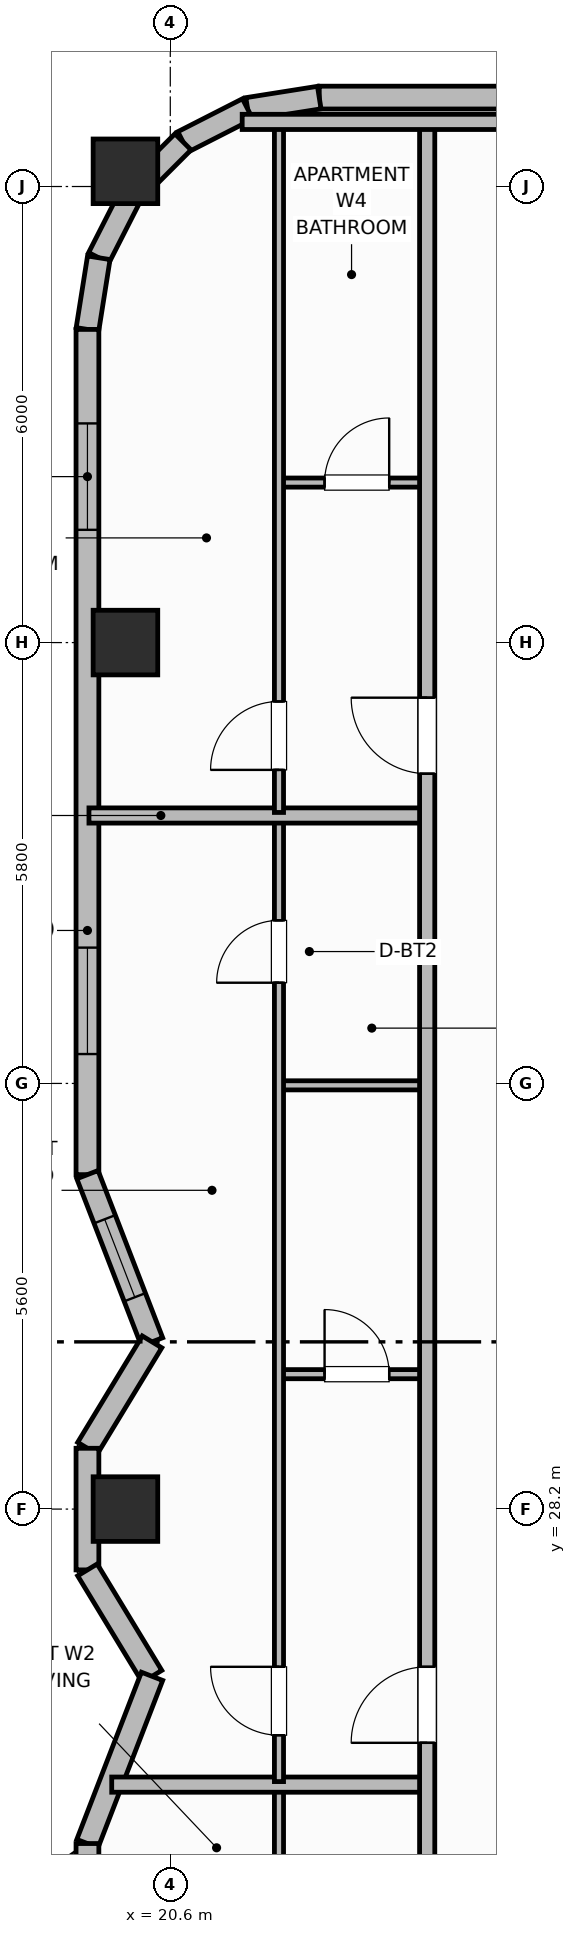
"""IFC4 building model, lengths in metres.
Left out: names, types, materials, properties, quantities, classifications, styles, units other than length and angle.
Written with IfcOpenShell. Run it as: python <this file> out.ifc"""

import sys

from ifc_helpers import new_model, si_unit, direction, frame, frame_2d, origin, origin_2d, place, context, subcontext, project, spatial, rectangle, extrude, element, fill, save


model = new_model("IFC4")
c1 = context("Model", 3, precision=1e-05, world=origin(), true_north=direction((0.0, 1.0)))
c2 = subcontext(c1, "Body", "Model", "MODEL_VIEW")
j1 = project(units=[si_unit("LENGTHUNIT", "METRE"), si_unit("PLANEANGLEUNIT", "RADIAN")], contexts=[c1])
p1 = place(None, origin())
s1 = spatial("IfcSite", under=j1, at=p1, CompositionType="ELEMENT")
p2 = place(p1, origin())
s2 = spatial("IfcBuilding", under=s1, at=p2, CompositionType="ELEMENT")
p3 = place(p2, frame((0.0, 0.0, 233.2)))
s3 = spatial("IfcBuildingStorey", under=s2, at=p3, CompositionType="ELEMENT", Elevation=233.2)
for number, where, z_axis, x_axis in (
    (1, (20.01, 28.2, 0.0), (0.0, 0.0, 1.0), (1.0, 0.0, 0.0)),
    (2, (20.01, 39.6, 0.0), (0.0, 0.0, 1.0), (1.0, 0.0, 0.0)),
    (3, (20.01, 45.8, 0.0), (0.0, 0.0, 1.0), (1.0, 0.0, 0.0)),
):
    element("IfcColumn", number, at=place(p3, frame(where, z_axis=z_axis, x_axis=x_axis)), inside=s3, PredefinedType="COLUMN", context=c2, shape_type="SweptSolid", body=[
        extrude(rectangle(XDim=0.85, YDim=0.85, at=origin_2d()), origin(), (0.0, 0.0, 1.0), 3.7),
    ])
p4 = place(p3, frame((55.84, 46.77, 0.0), z_axis=(0.0, 0.0, 1.0), x_axis=(-1.0, 0.0, 0.0)))
e4 = element("IfcWall", 4, at=p4, inside=s3, PredefinedType="SOLIDWALL", context=c2, shape_type="SweptSolid", body=[
    extrude(rectangle(XDim=33.28, YDim=0.3, at=frame_2d((16.64, 0.0))), origin(), (0.0, 0.0, 1.0), 2.73),
])
p5 = place(p4, frame((4.647, 0.0, 0.71)))
e5 = element("IfcOpeningElement", 5, at=p5, cuts=e4, PredefinedType="OPENING", context=c2, shape_type="SweptSolid", body=[
    extrude(rectangle(XDim=1.6, YDim=1.9, at=frame_2d((0.8, 0.95))), frame((0.0, 0.16, 0.0), z_axis=(0.0, -1.0, 0.0), x_axis=(1.0, 0.0, 0.0)), (0.0, 0.0, 1.0), 0.32),
])
p6 = place(p4, frame((7.845, 0.0, 0.71)))
e6 = element("IfcOpeningElement", 6, at=p6, cuts=e4, PredefinedType="OPENING", context=c2, shape_type="SweptSolid", body=[
    extrude(rectangle(XDim=1.6, YDim=1.9, at=frame_2d((0.8, 0.95))), frame((0.0, 0.16, 0.0), z_axis=(0.0, -1.0, 0.0), x_axis=(1.0, 0.0, 0.0)), (0.0, 0.0, 1.0), 0.32),
])
p7 = place(p4, frame((14.241, 0.0, 0.71)))
e7 = element("IfcOpeningElement", 7, at=p7, cuts=e4, PredefinedType="OPENING", context=c2, shape_type="SweptSolid", body=[
    extrude(rectangle(XDim=1.6, YDim=1.9, at=frame_2d((0.8, 0.95))), frame((0.0, 0.16, 0.0), z_axis=(0.0, -1.0, 0.0), x_axis=(1.0, 0.0, 0.0)), (0.0, 0.0, 1.0), 0.32),
])
p8 = place(p4, frame((17.439, 0.0, 0.71)))
e8 = element("IfcOpeningElement", 8, at=p8, cuts=e4, PredefinedType="OPENING", context=c2, shape_type="SweptSolid", body=[
    extrude(rectangle(XDim=1.6, YDim=1.9, at=frame_2d((0.8, 0.95))), frame((0.0, 0.16, 0.0), z_axis=(0.0, -1.0, 0.0), x_axis=(1.0, 0.0, 0.0)), (0.0, 0.0, 1.0), 0.32),
])
p9 = place(p4, frame((23.835, 0.0, 0.71)))
e9 = element("IfcOpeningElement", 9, at=p9, cuts=e4, PredefinedType="OPENING", context=c2, shape_type="SweptSolid", body=[
    extrude(rectangle(XDim=1.6, YDim=1.9, at=frame_2d((0.8, 0.95))), frame((0.0, 0.16, 0.0), z_axis=(0.0, -1.0, 0.0), x_axis=(1.0, 0.0, 0.0)), (0.0, 0.0, 1.0), 0.32),
])
p10 = place(p4, frame((27.033, 0.0, 0.71)))
e10 = element("IfcOpeningElement", 10, at=p10, cuts=e4, PredefinedType="OPENING", context=c2, shape_type="SweptSolid", body=[
    extrude(rectangle(XDim=1.6, YDim=1.9, at=frame_2d((0.8, 0.95))), frame((0.0, 0.16, 0.0), z_axis=(0.0, -1.0, 0.0), x_axis=(1.0, 0.0, 0.0)), (0.0, 0.0, 1.0), 0.32),
])
p11 = place(p3, frame((22.56, 46.77, 0.0), z_axis=(0.0, 0.0, 1.0), x_axis=(-0.987669453596, -0.156553666304, 0.0)))
e11 = element("IfcWall", 11, at=p11, inside=s3, PredefinedType="SOLIDWALL", context=c2, shape_type="SweptSolid", body=[
    extrude(rectangle(XDim=0.954, YDim=0.3, at=frame_2d((0.477, 0.0))), origin(), (0.0, 0.0, 1.0), 2.73),
])
p12 = place(p3, frame((21.617, 46.621, 0.0), z_axis=(0.0, 0.0, 1.0), x_axis=(-0.891023873617, -0.45395644796, 0.0)))
e12 = element("IfcWall", 12, at=p12, inside=s3, PredefinedType="SOLIDWALL", context=c2, shape_type="SweptSolid", body=[
    extrude(rectangle(XDim=0.954, YDim=0.3, at=frame_2d((0.477, 0.0))), origin(), (0.0, 0.0, 1.0), 2.73),
])
p13 = place(p3, frame((20.767, 46.188, 0.0), z_axis=(0.0, 0.0, 1.0), x_axis=(-0.707106781187, -0.707106781187, 0.0)))
e13 = element("IfcWall", 13, at=p13, inside=s3, PredefinedType="SOLIDWALL", context=c2, shape_type="SweptSolid", body=[
    extrude(rectangle(XDim=0.954, YDim=0.3, at=frame_2d((0.477, 0.0))), origin(), (0.0, 0.0, 1.0), 2.73),
])
p14 = place(p3, frame((20.093, 45.513, 0.0), z_axis=(0.0, 0.0, 1.0), x_axis=(-0.454159573051, -0.890920356825, 0.0)))
e14 = element("IfcWall", 14, at=p14, inside=s3, PredefinedType="SOLIDWALL", context=c2, shape_type="SweptSolid", body=[
    extrude(rectangle(XDim=0.954, YDim=0.3, at=frame_2d((0.477, 0.0))), origin(), (0.0, 0.0, 1.0), 2.73),
])
p15 = place(p3, frame((19.659, 44.663, 0.0), z_axis=(0.0, 0.0, 1.0), x_axis=(-0.156304114255, -0.987708977314, 0.0)))
e15 = element("IfcWall", 15, at=p15, inside=s3, PredefinedType="SOLIDWALL", context=c2, shape_type="SweptSolid", body=[
    extrude(rectangle(XDim=0.954, YDim=0.3, at=frame_2d((0.477, 0.0))), origin(), (0.0, 0.0, 1.0), 2.73),
])
p16 = place(p3, frame((19.51, 43.72, 0.0), z_axis=(0.0, 0.0, 1.0), x_axis=(0.0, -1.0, 0.0)))
e16 = element("IfcWall", 16, at=p16, inside=s3, PredefinedType="SOLIDWALL", context=c2, shape_type="SweptSolid", body=[
    extrude(rectangle(XDim=11.12, YDim=0.3, at=frame_2d((5.56, 0.0))), origin(), (0.0, 0.0, 1.0), 2.73),
])
p17 = place(p16, frame((1.237, 0.0, 0.76)))
e17 = element("IfcOpeningElement", 17, at=p17, cuts=e16, PredefinedType="OPENING", context=c2, shape_type="SweptSolid", body=[
    extrude(rectangle(XDim=1.4, YDim=1.85, at=frame_2d((0.7, 0.925))), frame((0.0, 0.16, 0.0), z_axis=(0.0, -1.0, 0.0), x_axis=(1.0, 0.0, 0.0)), (0.0, 0.0, 1.0), 0.32),
])
p18 = place(p16, frame((8.133, 0.0, 0.76)))
e18 = element("IfcOpeningElement", 18, at=p18, cuts=e16, PredefinedType="OPENING", context=c2, shape_type="SweptSolid", body=[
    extrude(rectangle(XDim=1.4, YDim=1.85, at=frame_2d((0.7, 0.925))), frame((0.0, 0.16, 0.0), z_axis=(0.0, -1.0, 0.0), x_axis=(1.0, 0.0, 0.0)), (0.0, 0.0, 1.0), 0.32),
])
p19 = place(p3, frame((19.51, 32.6, 0.0), z_axis=(0.0, 0.0, 1.0), x_axis=(0.36040746662, -0.932794971044, 0.0)))
e19 = element("IfcWall", 19, at=p19, inside=s3, PredefinedType="SOLIDWALL", context=c2, shape_type="SweptSolid", body=[
    extrude(rectangle(XDim=2.359, YDim=0.3, at=frame_2d((1.179, 0.0))), origin(), (0.0, 0.0, 1.0), 2.73),
])
p20 = place(p19, frame((0.629, 0.0, 0.92)))
e20 = element("IfcOpeningElement", 20, at=p20, cuts=e19, PredefinedType="OPENING", context=c2, shape_type="SweptSolid", body=[
    extrude(rectangle(XDim=1.1, YDim=1.65, at=frame_2d((0.55, 0.825))), frame((0.0, 0.16, 0.0), z_axis=(0.0, -1.0, 0.0), x_axis=(1.0, 0.0, 0.0)), (0.0, 0.0, 1.0), 0.32),
])
p21 = place(p3, frame((20.36, 30.4, 0.0), z_axis=(0.0, 0.0, 1.0), x_axis=(-0.5190481505, -0.854745001426, 0.0)))
e21 = element("IfcWall", 21, at=p21, inside=s3, PredefinedType="SOLIDWALL", context=c2, shape_type="SweptSolid", body=[
    extrude(rectangle(XDim=1.638, YDim=0.3, at=frame_2d((0.819, 0.0))), origin(), (0.0, 0.0, 1.0), 2.73),
])
p22 = place(p3, frame((19.51, 29.0, 0.0), z_axis=(0.0, 0.0, 1.0), x_axis=(0.0, -1.0, 0.0)))
e22 = element("IfcWall", 22, at=p22, inside=s3, PredefinedType="SOLIDWALL", context=c2, shape_type="SweptSolid", body=[
    extrude(rectangle(XDim=1.6, YDim=0.3, at=frame_2d((0.8, 0.0))), origin(), (0.0, 0.0, 1.0), 2.73),
])
p23 = place(p3, frame((19.51, 27.4, 0.0), z_axis=(0.0, 0.0, 1.0), x_axis=(0.5190481505, -0.854745001426, 0.0)))
e23 = element("IfcWall", 23, at=p23, inside=s3, PredefinedType="SOLIDWALL", context=c2, shape_type="SweptSolid", body=[
    extrude(rectangle(XDim=1.638, YDim=0.3, at=frame_2d((0.819, 0.0))), origin(), (0.0, 0.0, 1.0), 2.73),
])
p24 = place(p3, frame((20.36, 26.0, 0.0), z_axis=(0.0, 0.0, 1.0), x_axis=(-0.360442266984, -0.932781524351, 0.0)))
e24 = element("IfcWall", 24, at=p24, inside=s3, PredefinedType="SOLIDWALL", context=c2, shape_type="SweptSolid", body=[
    extrude(rectangle(XDim=2.358, YDim=0.3, at=frame_2d((1.179, 0.0))), origin(), (0.0, 0.0, 1.0), 2.73),
])
p25 = place(p3, frame((19.51, 23.8, 0.0), z_axis=(0.0, 0.0, 1.0), x_axis=(0.0, -1.0, 0.0)))
e25 = element("IfcWall", 25, at=p25, inside=s3, PredefinedType="SOLIDWALL", context=c2, shape_type="SweptSolid", body=[
    extrude(rectangle(XDim=11.12, YDim=0.3, at=frame_2d((5.56, 0.0))), origin(), (0.0, 0.0, 1.0), 2.73),
])
p26 = place(p25, frame((1.7, 0.0, 0.0)))
e26 = element("IfcOpeningElement", 26, at=p26, cuts=e25, PredefinedType="OPENING", context=c2, shape_type="SweptSolid", body=[
    extrude(rectangle(XDim=1.6, YDim=2.1, at=frame_2d((0.8, 1.05))), frame((0.0, 0.16, 0.0), z_axis=(0.0, -1.0, 0.0), x_axis=(1.0, 0.0, 0.0)), (0.0, 0.0, 1.0), 0.32),
])
p27 = place(p25, frame((8.283, 0.0, 0.95)))
e27 = element("IfcOpeningElement", 27, at=p27, cuts=e25, PredefinedType="OPENING", context=c2, shape_type="SweptSolid", body=[
    extrude(rectangle(XDim=1.1, YDim=1.65, at=frame_2d((0.55, 0.825))), frame((0.0, 0.16, 0.0), z_axis=(0.0, -1.0, 0.0), x_axis=(1.0, 0.0, 0.0)), (0.0, 0.0, 1.0), 0.32),
])
p28 = place(p3, frame((22.03, 19.115, 0.0), z_axis=(0.0, 0.0, 1.0), x_axis=(0.0, 1.0, 0.0)))
e28 = element("IfcWall", 28, at=p28, inside=s3, PredefinedType="PARTITIONING", context=c2, shape_type="SweptSolid", body=[
    extrude(rectangle(XDim=5.42, YDim=0.12, at=frame_2d((2.71, 0.0))), origin(), (0.0, 0.0, 1.0), 2.56),
])
p29 = place(p28, frame((0.61, 0.0, 0.0)))
e29 = element("IfcOpeningElement", 29, at=p29, cuts=e28, PredefinedType="OPENING", context=c2, shape_type="SweptSolid", body=[
    extrude(rectangle(XDim=0.9, YDim=2.1, at=frame_2d((0.45, 1.05))), frame((0.0, 0.07, 0.0), z_axis=(0.0, -1.0, 0.0), x_axis=(1.0, 0.0, 0.0)), (0.0, 0.0, 1.0), 0.14),
])
p30 = place(p3, frame((19.829, 24.575, 0.0), z_axis=(0.0, 0.0, 1.0), x_axis=(1.0, 0.0, 0.0)))
e30 = element("IfcWall", 30, at=p30, inside=s3, PredefinedType="PARTITIONING", context=c2, shape_type="SweptSolid", body=[
    extrude(rectangle(XDim=4.151, YDim=0.2, at=frame_2d((2.075, 0.0))), origin(), (0.0, 0.0, 1.0), 2.56),
])
p31 = place(p3, frame((22.03, 29.975, 0.0), z_axis=(0.0, 0.0, 1.0), x_axis=(1.0, 0.0, 0.0)))
e31 = element("IfcWall", 31, at=p31, inside=s3, PredefinedType="PARTITIONING", context=c2, shape_type="SweptSolid", body=[
    extrude(rectangle(XDim=1.95, YDim=0.12, at=frame_2d((0.975, 0.0))), origin(), (0.0, 0.0, 1.0), 2.56),
])
p32 = place(p31, frame((0.6, 0.0, 0.0)))
e32 = element("IfcOpeningElement", 32, at=p32, cuts=e31, PredefinedType="OPENING", context=c2, shape_type="SweptSolid", body=[
    extrude(rectangle(XDim=0.85, YDim=2.1, at=frame_2d((0.425, 1.05))), frame((0.0, 0.07, 0.0), z_axis=(0.0, -1.0, 0.0), x_axis=(1.0, 0.0, 0.0)), (0.0, 0.0, 1.0), 0.14),
])
p33 = place(p3, frame((22.03, 33.775, 0.0), z_axis=(0.0, 0.0, 1.0), x_axis=(1.0, 0.0, 0.0)))
e33 = element("IfcWall", 33, at=p33, inside=s3, PredefinedType="PARTITIONING", context=c2, shape_type="SweptSolid", body=[
    extrude(rectangle(XDim=1.95, YDim=0.12, at=frame_2d((0.975, 0.0))), origin(), (0.0, 0.0, 1.0), 2.56),
])
p34 = place(p3, frame((22.03, 24.615, 0.0), z_axis=(0.0, 0.0, 1.0), x_axis=(0.0, 1.0, 0.0)))
e34 = element("IfcWall", 34, at=p34, inside=s3, PredefinedType="PARTITIONING", context=c2, shape_type="SweptSolid", body=[
    extrude(rectangle(XDim=12.67, YDim=0.12, at=frame_2d((6.335, 0.0))), origin(), (0.0, 0.0, 1.0), 2.56),
])
p35 = place(p34, frame((0.61, 0.0, 0.0)))
e35 = element("IfcOpeningElement", 35, at=p35, cuts=e34, PredefinedType="OPENING", context=c2, shape_type="SweptSolid", body=[
    extrude(rectangle(XDim=0.9, YDim=2.1, at=frame_2d((0.45, 1.05))), frame((0.0, 0.07, 0.0), z_axis=(0.0, -1.0, 0.0), x_axis=(1.0, 0.0, 0.0)), (0.0, 0.0, 1.0), 0.14),
])
p36 = place(p34, frame((10.51, 0.0, 0.0)))
e36 = element("IfcOpeningElement", 36, at=p36, cuts=e34, PredefinedType="OPENING", context=c2, shape_type="SweptSolid", body=[
    extrude(rectangle(XDim=0.82, YDim=2.08, at=frame_2d((0.41, 1.04))), frame((0.0, 0.07, 0.0), z_axis=(0.0, -1.0, 0.0), x_axis=(1.0, 0.0, 0.0)), (0.0, 0.0, 1.0), 0.14),
])
p37 = place(p3, frame((19.53, 37.325, 0.0), z_axis=(0.0, 0.0, 1.0), x_axis=(1.0, 0.0, 0.0)))
e37 = element("IfcWall", 37, at=p37, inside=s3, PredefinedType="PARTITIONING", context=c2, shape_type="SweptSolid", body=[
    extrude(rectangle(XDim=4.45, YDim=0.2, at=frame_2d((2.225, 0.0))), origin(), (0.0, 0.0, 1.0), 2.56),
])
p38 = place(p3, frame((22.03, 41.705, 0.0), z_axis=(0.0, 0.0, 1.0), x_axis=(1.0, 0.0, 0.0)))
e38 = element("IfcWall", 38, at=p38, inside=s3, PredefinedType="PARTITIONING", context=c2, shape_type="SweptSolid", body=[
    extrude(rectangle(XDim=1.95, YDim=0.12, at=frame_2d((0.975, 0.0))), origin(), (0.0, 0.0, 1.0), 2.56),
])
p39 = place(p38, frame((0.6, 0.0, 0.0)))
e39 = element("IfcOpeningElement", 39, at=p39, cuts=e38, PredefinedType="OPENING", context=c2, shape_type="SweptSolid", body=[
    extrude(rectangle(XDim=0.85, YDim=2.1, at=frame_2d((0.425, 1.05))), frame((0.0, 0.07, 0.0), z_axis=(0.0, -1.0, 0.0), x_axis=(1.0, 0.0, 0.0)), (0.0, 0.0, 1.0), 0.14),
])
p40 = place(p3, frame((22.03, 37.365, 0.0), z_axis=(0.0, 0.0, 1.0), x_axis=(0.0, 1.0, 0.0)))
e40 = element("IfcWall", 40, at=p40, inside=s3, PredefinedType="PARTITIONING", context=c2, shape_type="SweptSolid", body=[
    extrude(rectangle(XDim=9.045, YDim=0.12, at=frame_2d((4.522, 0.0))), origin(), (0.0, 0.0, 1.0), 2.56),
])
p41 = place(p40, frame((0.56, 0.0, 0.0)))
e41 = element("IfcOpeningElement", 41, at=p41, cuts=e40, PredefinedType="OPENING", context=c2, shape_type="SweptSolid", body=[
    extrude(rectangle(XDim=0.9, YDim=2.1, at=frame_2d((0.45, 1.05))), frame((0.0, 0.07, 0.0), z_axis=(0.0, -1.0, 0.0), x_axis=(1.0, 0.0, 0.0)), (0.0, 0.0, 1.0), 0.14),
])
p42 = place(p3, frame((23.98, 9.95, 0.0), z_axis=(0.0, 0.0, 1.0), x_axis=(0.0, 1.0, 0.0)))
e42 = element("IfcWall", 42, at=p42, inside=s3, PredefinedType="PARTITIONING", context=c2, shape_type="SweptSolid", body=[
    extrude(rectangle(XDim=36.5, YDim=0.2, at=frame_2d((18.25, 0.0))), origin(), (0.0, 0.0, 1.0), 2.56),
])
p43 = place(p42, frame((2.93, 0.0, 0.0)))
e43 = element("IfcOpeningElement", 43, at=p43, cuts=e42, PredefinedType="OPENING", context=c2, shape_type="SweptSolid", body=[
    extrude(rectangle(XDim=1.0, YDim=2.15, at=frame_2d((0.5, 1.075))), frame((0.0, 0.11, 0.0), z_axis=(0.0, -1.0, 0.0), x_axis=(1.0, 0.0, 0.0)), (0.0, 0.0, 1.0), 0.22),
])
p44 = place(p42, frame((10.525, 0.0, 0.0)))
e44 = element("IfcOpeningElement", 44, at=p44, cuts=e42, PredefinedType="OPENING", context=c2, shape_type="SweptSolid", body=[
    extrude(rectangle(XDim=1.0, YDim=2.15, at=frame_2d((0.5, 1.075))), frame((0.0, 0.11, 0.0), z_axis=(0.0, -1.0, 0.0), x_axis=(1.0, 0.0, 0.0)), (0.0, 0.0, 1.0), 0.22),
])
p45 = place(p42, frame((15.175, 0.0, 0.0)))
e45 = element("IfcOpeningElement", 45, at=p45, cuts=e42, PredefinedType="OPENING", context=c2, shape_type="SweptSolid", body=[
    extrude(rectangle(XDim=1.0, YDim=2.15, at=frame_2d((0.5, 1.075))), frame((0.0, 0.11, 0.0), z_axis=(0.0, -1.0, 0.0), x_axis=(1.0, 0.0, 0.0)), (0.0, 0.0, 1.0), 0.22),
])
p46 = place(p42, frame((27.925, 0.0, 0.0)))
e46 = element("IfcOpeningElement", 46, at=p46, cuts=e42, PredefinedType="OPENING", context=c2, shape_type="SweptSolid", body=[
    extrude(rectangle(XDim=1.0, YDim=2.15, at=frame_2d((0.5, 1.075))), frame((0.0, 0.11, 0.0), z_axis=(0.0, -1.0, 0.0), x_axis=(1.0, 0.0, 0.0)), (0.0, 0.0, 1.0), 0.22),
])
p47 = place(p3, frame((21.546, 46.45, 0.0), z_axis=(0.0, 0.0, 1.0), x_axis=(1.0, 0.0, 0.0)))
e47 = element("IfcWall", 47, at=p47, inside=s3, PredefinedType="PARTITIONING", context=c2, shape_type="SweptSolid", body=[
    extrude(rectangle(XDim=3.754, YDim=0.2, at=frame_2d((1.877, 0.0))), origin(), (0.0, 0.0, 1.0), 2.56),
])
p48 = place(p17, origin())
e48 = element("IfcWindow", 48, at=p48, inside=s3, PartitioningType="SINGLE_PANEL", PredefinedType="WINDOW", context=c2, shape_type="SweptSolid", body=[
    extrude(rectangle(XDim=1.4, YDim=1.85, at=frame_2d((0.7, 0.925))), frame((0.0, 0.03, 0.0), z_axis=(0.0, -1.0, 0.0), x_axis=(1.0, 0.0, 0.0)), (0.0, 0.0, 1.0), 0.06),
])
fill(e17, e48)
p49 = place(p18, origin())
e49 = element("IfcWindow", 49, at=p49, inside=s3, PartitioningType="SINGLE_PANEL", PredefinedType="WINDOW", context=c2, shape_type="SweptSolid", body=[
    extrude(rectangle(XDim=1.4, YDim=1.85, at=frame_2d((0.7, 0.925))), frame((0.0, 0.03, 0.0), z_axis=(0.0, -1.0, 0.0), x_axis=(1.0, 0.0, 0.0)), (0.0, 0.0, 1.0), 0.06),
])
fill(e18, e49)
p50 = place(p20, origin())
e50 = element("IfcWindow", 50, at=p50, inside=s3, PartitioningType="SINGLE_PANEL", PredefinedType="WINDOW", context=c2, shape_type="SweptSolid", body=[
    extrude(rectangle(XDim=1.1, YDim=1.65, at=frame_2d((0.55, 0.825))), frame((0.0, 0.03, 0.0), z_axis=(0.0, -1.0, 0.0), x_axis=(1.0, 0.0, 0.0)), (0.0, 0.0, 1.0), 0.06),
])
fill(e20, e50)
p51 = place(p32, origin())
e51 = element("IfcDoor", 51, at=p51, inside=s3, OperationType="SINGLE_SWING_LEFT", PredefinedType="DOOR", context=c2, shape_type="SweptSolid", body=[
    extrude(rectangle(XDim=0.85, YDim=2.1, at=frame_2d((0.425, 1.05))), frame((0.0, 0.025, 0.0), z_axis=(0.0, -1.0, 0.0), x_axis=(1.0, 0.0, 0.0)), (0.0, 0.0, 1.0), 0.05),
])
fill(e32, e51)
p52 = place(p35, origin())
e52 = element("IfcDoor", 52, at=p52, inside=s3, OperationType="SINGLE_SWING_RIGHT", PredefinedType="DOOR", context=c2, shape_type="SweptSolid", body=[
    extrude(rectangle(XDim=0.9, YDim=2.1, at=frame_2d((0.45, 1.05))), frame((0.0, 0.025, 0.0), z_axis=(0.0, -1.0, 0.0), x_axis=(1.0, 0.0, 0.0)), (0.0, 0.0, 1.0), 0.05),
])
fill(e35, e52)
p53 = place(p36, origin())
e53 = element("IfcDoor", 53, at=p53, inside=s3, OperationType="SINGLE_SWING_LEFT", PredefinedType="DOOR", context=c2, shape_type="SweptSolid", body=[
    extrude(rectangle(XDim=0.82, YDim=2.08, at=frame_2d((0.41, 1.04))), frame((0.0, 0.025, 0.0), z_axis=(0.0, -1.0, 0.0), x_axis=(1.0, 0.0, 0.0)), (0.0, 0.0, 1.0), 0.05),
])
fill(e36, e53)
p54 = place(p39, origin())
e54 = element("IfcDoor", 54, at=p54, inside=s3, OperationType="SINGLE_SWING_RIGHT", PredefinedType="DOOR", context=c2, shape_type="SweptSolid", body=[
    extrude(rectangle(XDim=0.85, YDim=2.1, at=frame_2d((0.425, 1.05))), frame((0.0, 0.025, 0.0), z_axis=(0.0, -1.0, 0.0), x_axis=(1.0, 0.0, 0.0)), (0.0, 0.0, 1.0), 0.05),
])
fill(e39, e54)
p55 = place(p41, origin())
e55 = element("IfcDoor", 55, at=p55, inside=s3, OperationType="SINGLE_SWING_LEFT", PredefinedType="DOOR", context=c2, shape_type="SweptSolid", body=[
    extrude(rectangle(XDim=0.9, YDim=2.1, at=frame_2d((0.45, 1.05))), frame((0.0, 0.025, 0.0), z_axis=(0.0, -1.0, 0.0), x_axis=(1.0, 0.0, 0.0)), (0.0, 0.0, 1.0), 0.05),
])
fill(e41, e55)
p56 = place(p45, origin())
e56 = element("IfcDoor", 56, at=p56, inside=s3, OperationType="SINGLE_SWING_LEFT", PredefinedType="DOOR", context=c2, shape_type="SweptSolid", body=[
    extrude(rectangle(XDim=1.0, YDim=2.15, at=frame_2d((0.5, 1.075))), frame((0.0, 0.025, 0.0), z_axis=(0.0, -1.0, 0.0), x_axis=(1.0, 0.0, 0.0)), (0.0, 0.0, 1.0), 0.05),
])
fill(e45, e56)
p57 = place(p46, origin())
e57 = element("IfcDoor", 57, at=p57, inside=s3, OperationType="SINGLE_SWING_RIGHT", PredefinedType="DOOR", context=c2, shape_type="SweptSolid", body=[
    extrude(rectangle(XDim=1.0, YDim=2.15, at=frame_2d((0.5, 1.075))), frame((0.0, 0.025, 0.0), z_axis=(0.0, -1.0, 0.0), x_axis=(1.0, 0.0, 0.0)), (0.0, 0.0, 1.0), 0.05),
])
fill(e46, e57)
save(model, sys.argv[1])
